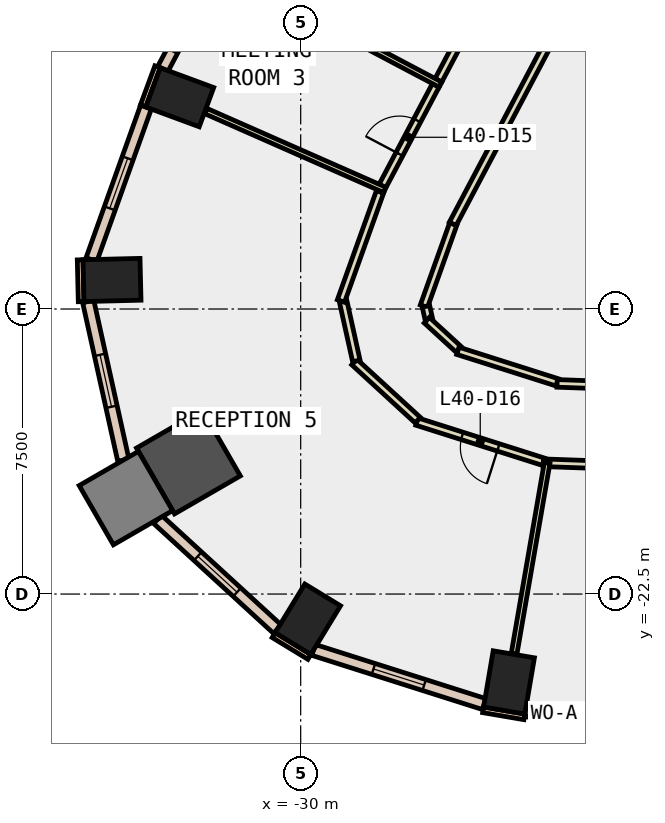
"""IFC4 building model, lengths in metres.
Left out: names, types, materials, properties, quantities, classifications, styles, units other than length and angle.
Written with IfcOpenShell. Run it as: python <this file> out.ifc"""

import sys

from ifc_helpers import new_model, si_unit, direction, frame, frame_2d, origin, origin_2d, place, context, subcontext, project, spatial, rectangle, extrude, element, fill, save


model = new_model("IFC4")
c1 = context("Model", 3, precision=1e-05, world=origin(), true_north=direction((0.0, 1.0)))
c2 = subcontext(c1, "Body", "Model", "MODEL_VIEW")
j1 = project(units=[si_unit("LENGTHUNIT", "METRE"), si_unit("PLANEANGLEUNIT", "RADIAN")], contexts=[c1])
p1 = place(None, origin())
s1 = spatial("IfcSite", under=j1, at=p1, CompositionType="ELEMENT")
p2 = place(p1, origin())
s2 = spatial("IfcBuilding", under=s1, at=p2, CompositionType="ELEMENT")
p3 = place(p2, frame((0.0, 0.0, 180.2)))
s3 = spatial("IfcBuildingStorey", under=s2, at=p3, CompositionType="ELEMENT", Elevation=180.2)
for number, where, z_axis, x_axis in (
    (1, (-24.518, -24.825, -0.4), (0.0, 0.0, 1.0), (-0.986, 0.168, 0.0)),
    (2, (-33.183, -9.429, -0.4), (0.0, 0.0, 1.0), (0.347, 0.938, 0.0)),
    (3, (-34.965, -14.236, -0.4), (0.0, 0.0, 1.0), (-0.024, 1.0, 0.0)),
):
    element("IfcColumn", number, at=place(p3, frame(where, z_axis=z_axis, x_axis=x_axis)), inside=s3, PredefinedType="COLUMN", context=c2, shape_type="SweptSolid", body=[
        extrude(rectangle(XDim=1.1, YDim=1.5, at=origin_2d()), origin(), (0.0, 0.0, 1.0), 4.0),
    ])
p4 = place(p3, frame((-32.954, -19.025, -0.4), z_axis=(0.0, 0.0, 1.0), x_axis=(0.866025403784, 0.5, 0.0)))
e4 = element("IfcColumn", 4, at=p4, inside=s3, PredefinedType="COLUMN", context=c2, shape_type="SweptSolid", body=[
    extrude(rectangle(XDim=2.0, YDim=2.0, at=origin_2d()), origin(), (0.0, 0.0, 1.0), 4.0),
])
p5 = place(p3, frame((-29.812, -23.163, -0.4), z_axis=(0.0, 0.0, 1.0), x_axis=(-0.853714435155, 0.520741455243, 0.0)))
e5 = element("IfcColumn", 5, at=p5, inside=s3, PredefinedType="COLUMN", context=c2, shape_type="SweptSolid", body=[
    extrude(rectangle(XDim=1.1, YDim=1.5, at=origin_2d()), origin(), (0.0, 0.0, 1.0), 4.0),
])
p6 = place(p3, frame((-34.599, -19.975, -0.4), z_axis=(0.0, 0.0, 1.0), x_axis=(0.866025403784, 0.5, 0.0)))
e6 = element("IfcColumn", 6, at=p6, inside=s3, PredefinedType="COLUMN", context=c2, shape_type="SweptSolid", body=[
    extrude(rectangle(XDim=1.8, YDim=1.8, at=origin_2d()), origin(), (0.0, 0.0, 1.0), 4.0),
])
p7 = place(p3, frame((-33.766, -8.627, 0.0), z_axis=(0.0, 0.0, 1.0), x_axis=(-0.346229846278, -0.938149718087, 0.0)))
e7 = element("IfcWall", 7, at=p7, inside=s3, PredefinedType="STANDARD", context=c2, shape_type="SweptSolid", body=[
    extrude(rectangle(XDim=1.1, YDim=0.15, at=frame_2d((0.55, 0.0))), origin(), (0.0, 0.0, 1.0), 3.6),
])
p8 = place(p3, frame((-25.199, -25.546, 0.0), z_axis=(0.0, 0.0, 1.0), x_axis=(0.985763338892, -0.168138751323, 0.0)))
e8 = element("IfcWall", 8, at=p8, inside=s3, PredefinedType="STANDARD", context=c2, shape_type="SweptSolid", body=[
    extrude(rectangle(XDim=1.101, YDim=0.15, at=frame_2d((0.55, 0.0))), origin(), (0.0, 0.0, 1.0), 3.6),
])
p9 = place(p3, frame((-35.803, -13.706, 0.0), z_axis=(0.0, 0.0, 1.0), x_axis=(0.023522901136, -0.999723298279, 0.0)))
e9 = element("IfcWall", 9, at=p9, inside=s3, PredefinedType="STANDARD", context=c2, shape_type="SweptSolid", body=[
    extrude(rectangle(XDim=1.1, YDim=0.15, at=frame_2d((0.55, 0.0))), origin(), (0.0, 0.0, 1.0), 3.6),
])
p10 = place(p3, frame((-30.711, -23.581, 0.0), z_axis=(0.0, 0.0, 1.0), x_axis=(0.854005542721, -0.520263907071, 0.0)))
e10 = element("IfcWall", 10, at=p10, inside=s3, PredefinedType="STANDARD", context=c2, shape_type="SweptSolid", body=[
    extrude(rectangle(XDim=1.099, YDim=0.15, at=frame_2d((0.55, 0.0))), origin(), (0.0, 0.0, 1.0), 3.6),
])
p11 = place(p3, frame((-24.09, -25.583, 0.0), z_axis=(0.0, 0.0, 1.0), x_axis=(0.999368368263, -0.035536805082, 0.0)))
e11 = element("IfcWall", 11, at=p11, inside=s3, PredefinedType="STANDARD", context=c2, shape_type="SweptSolid", body=[
    extrude(rectangle(XDim=7.317, YDim=0.3, at=frame_2d((3.658, 0.0))), origin(), (0.0, 0.0, 1.0), 3.6),
])
p12 = place(p11, frame((0.629, 0.0, 0.9)))
e12 = element("IfcOpeningElement", 12, at=p12, cuts=e11, PredefinedType="OPENING", context=c2, shape_type="SweptSolid", body=[
    extrude(rectangle(XDim=2.4, YDim=2.6, at=frame_2d((1.2, 1.3))), frame((0.0, 0.16, 0.0), z_axis=(0.0, -1.0, 0.0), x_axis=(1.0, 0.0, 0.0)), (0.0, 0.0, 1.0), 0.32),
])
p13 = place(p11, frame((4.287, 0.0, 0.9)))
e13 = element("IfcOpeningElement", 13, at=p13, cuts=e11, PredefinedType="OPENING", context=c2, shape_type="SweptSolid", body=[
    extrude(rectangle(XDim=2.4, YDim=2.6, at=frame_2d((1.2, 1.3))), frame((0.0, 0.16, 0.0), z_axis=(0.0, -1.0, 0.0), x_axis=(1.0, 0.0, 0.0)), (0.0, 0.0, 1.0), 0.32),
])
p14 = place(p3, frame((-30.765, -3.271, 0.0), z_axis=(0.0, 0.0, 1.0), x_axis=(-0.467572383403, -0.883954787463, 0.0)))
e14 = element("IfcWall", 14, at=p14, inside=s3, PredefinedType="STANDARD", context=c2, shape_type="SweptSolid", body=[
    extrude(rectangle(XDim=6.119, YDim=0.3, at=frame_2d((3.06, 0.0))), origin(), (0.0, 0.0, 1.0), 3.6),
])
p15 = place(p14, frame((0.53, 0.0, 0.9)))
e15 = element("IfcOpeningElement", 15, at=p15, cuts=e14, PredefinedType="OPENING", context=c2, shape_type="SweptSolid", body=[
    extrude(rectangle(XDim=2.0, YDim=2.6, at=frame_2d((1.0, 1.3))), frame((0.0, 0.16, 0.0), z_axis=(0.0, -1.0, 0.0), x_axis=(1.0, 0.0, 0.0)), (0.0, 0.0, 1.0), 0.32),
])
p16 = place(p14, frame((3.589, 0.0, 0.9)))
e16 = element("IfcOpeningElement", 16, at=p16, cuts=e14, PredefinedType="OPENING", context=c2, shape_type="SweptSolid", body=[
    extrude(rectangle(XDim=2.0, YDim=2.6, at=frame_2d((1.0, 1.3))), frame((0.0, 0.16, 0.0), z_axis=(0.0, -1.0, 0.0), x_axis=(1.0, 0.0, 0.0)), (0.0, 0.0, 1.0), 0.32),
])
p17 = place(p3, frame((-34.071, -9.686, 0.0), z_axis=(0.0, 0.0, 1.0), x_axis=(-0.336652028742, -0.941629126325, 0.0)))
e17 = element("IfcWall", 17, at=p17, inside=s3, PredefinedType="STANDARD", context=c2, shape_type="SweptSolid", body=[
    extrude(rectangle(XDim=4.263, YDim=0.3, at=frame_2d((2.131, 0.0))), origin(), (0.0, 0.0, 1.0), 3.6),
])
p18 = place(p17, frame((1.431, 0.0, 0.9)))
e18 = element("IfcOpeningElement", 18, at=p18, cuts=e17, PredefinedType="OPENING", context=c2, shape_type="SweptSolid", body=[
    extrude(rectangle(XDim=1.4, YDim=2.6, at=frame_2d((0.7, 1.3))), frame((0.0, 0.16, 0.0), z_axis=(0.0, -1.0, 0.0), x_axis=(1.0, 0.0, 0.0)), (0.0, 0.0, 1.0), 0.32),
])
p19 = place(p3, frame((-35.591, -14.801, 0.0), z_axis=(0.0, 0.0, 1.0), x_axis=(0.216102175589, -0.976370754225, 0.0)))
e19 = element("IfcWall", 19, at=p19, inside=s3, PredefinedType="STANDARD", context=c2, shape_type="SweptSolid", body=[
    extrude(rectangle(XDim=4.276, YDim=0.3, at=frame_2d((2.138, 0.0))), origin(), (0.0, 0.0, 1.0), 3.6),
])
p20 = place(p19, frame((1.438, 0.0, 0.9)))
e20 = element("IfcOpeningElement", 20, at=p20, cuts=e19, PredefinedType="OPENING", context=c2, shape_type="SweptSolid", body=[
    extrude(rectangle(XDim=1.4, YDim=2.6, at=frame_2d((0.7, 1.3))), frame((0.0, 0.16, 0.0), z_axis=(0.0, -1.0, 0.0), x_axis=(1.0, 0.0, 0.0)), (0.0, 0.0, 1.0), 0.32),
])
p21 = place(p3, frame((-33.768, -20.533, 0.0), z_axis=(0.0, 0.0, 1.0), x_axis=(0.737279680174, -0.675587650274, 0.0)))
e21 = element("IfcWall", 21, at=p21, inside=s3, PredefinedType="STANDARD", context=c2, shape_type="SweptSolid", body=[
    extrude(rectangle(XDim=4.278, YDim=0.3, at=frame_2d((2.139, 0.0))), origin(), (0.0, 0.0, 1.0), 3.6),
])
p22 = place(p21, frame((1.439, 0.0, 0.9)))
e22 = element("IfcOpeningElement", 22, at=p22, cuts=e21, PredefinedType="OPENING", context=c2, shape_type="SweptSolid", body=[
    extrude(rectangle(XDim=1.4, YDim=2.6, at=frame_2d((0.7, 1.3))), frame((0.0, 0.16, 0.0), z_axis=(0.0, -1.0, 0.0), x_axis=(1.0, 0.0, 0.0)), (0.0, 0.0, 1.0), 0.32),
])
p23 = place(p3, frame((-29.662, -23.97, 0.0), z_axis=(0.0, 0.0, 1.0), x_axis=(0.953145379857, -0.302512619337, 0.0)))
e23 = element("IfcWall", 23, at=p23, inside=s3, PredefinedType="STANDARD", context=c2, shape_type="SweptSolid", body=[
    extrude(rectangle(XDim=4.711, YDim=0.3, at=frame_2d((2.355, 0.0))), origin(), (0.0, 0.0, 1.0), 3.6),
])
p24 = place(p23, frame((1.655, 0.0, 0.9)))
e24 = element("IfcOpeningElement", 24, at=p24, cuts=e23, PredefinedType="OPENING", context=c2, shape_type="SweptSolid", body=[
    extrude(rectangle(XDim=1.4, YDim=2.6, at=frame_2d((0.7, 1.3))), frame((0.0, 0.16, 0.0), z_axis=(0.0, -1.0, 0.0), x_axis=(1.0, 0.0, 0.0)), (0.0, 0.0, 1.0), 0.32),
])
p25 = place(p3, frame((-22.888, -6.878, 0.0), z_axis=(0.0, 0.0, 1.0), x_axis=(-0.467533790284, -0.883975200411, 0.0)))
e25 = element("IfcWall", 25, at=p25, inside=s3, PredefinedType="PARTITIONING", context=c2, shape_type="SweptSolid", body=[
    extrude(rectangle(XDim=6.656, YDim=0.2, at=frame_2d((3.328, 0.0))), origin(), (0.0, 0.0, 1.0), 3.6),
])
p26 = place(p3, frame((-25.987, -12.768, 0.0), z_axis=(0.0, 0.0, 1.0), x_axis=(-0.33645112914, -0.941700927949, 0.0)))
e26 = element("IfcWall", 26, at=p26, inside=s3, PredefinedType="PARTITIONING", context=c2, shape_type="SweptSolid", body=[
    extrude(rectangle(XDim=2.292, YDim=0.2, at=frame_2d((1.146, 0.0))), origin(), (0.0, 0.0, 1.0), 3.6),
])
p27 = place(p3, frame((-26.703, -14.93, 0.0), z_axis=(0.0, 0.0, 1.0), x_axis=(0.216250293589, -0.976337959173, 0.0)))
e27 = element("IfcWall", 27, at=p27, inside=s3, PredefinedType="PARTITIONING", context=c2, shape_type="SweptSolid", body=[
    extrude(rectangle(XDim=0.342, YDim=0.2, at=frame_2d((0.171, 0.0))), origin(), (0.0, 0.0, 1.0), 3.6),
])
p28 = place(p3, frame((-26.681, -15.294, 0.0), z_axis=(0.0, 0.0, 1.0), x_axis=(0.737118519418, -0.675763485497, 0.0)))
e28 = element("IfcWall", 28, at=p28, inside=s3, PredefinedType="PARTITIONING", context=c2, shape_type="SweptSolid", body=[
    extrude(rectangle(XDim=1.138, YDim=0.2, at=frame_2d((0.569, 0.0))), origin(), (0.0, 0.0, 1.0), 3.6),
])
p29 = place(p3, frame((-25.864, -16.1, 0.0), z_axis=(0.0, 0.0, 1.0), x_axis=(0.953158072423, -0.302472625167, 0.0)))
e29 = element("IfcWall", 29, at=p29, inside=s3, PredefinedType="PARTITIONING", context=c2, shape_type="SweptSolid", body=[
    extrude(rectangle(XDim=2.743, YDim=0.2, at=frame_2d((1.372, 0.0))), origin(), (0.0, 0.0, 1.0), 3.6),
])
p30 = place(p3, frame((-23.253, -16.957, 0.0), z_axis=(0.0, 0.0, 1.0), x_axis=(0.999365460355, -0.035618487468, 0.0)))
e30 = element("IfcWall", 30, at=p30, inside=s3, PredefinedType="PARTITIONING", context=c2, shape_type="SweptSolid", body=[
    extrude(rectangle(XDim=7.272, YDim=0.2, at=frame_2d((3.636, 0.0))), origin(), (0.0, 0.0, 1.0), 3.6),
])
p31 = place(p3, frame((-26.376, -8.982, 0.0), z_axis=(0.0, 0.0, 1.0), x_axis=(0.467529077139, 0.883977693174, 0.0)))
e31 = element("IfcWall", 31, at=p31, inside=s3, PredefinedType="PARTITIONING", context=c2, shape_type="SweptSolid", body=[
    extrude(rectangle(XDim=3.503, YDim=0.2, at=frame_2d((1.752, 0.0))), origin(), (0.0, 0.0, 1.0), 3.6),
])
p32 = place(p3, frame((-27.891, -11.847, 0.0), z_axis=(0.0, 0.0, 1.0), x_axis=(0.467571923705, 0.883955030623, 0.0)))
e32 = element("IfcWall", 32, at=p32, inside=s3, PredefinedType="PARTITIONING", context=c2, shape_type="SweptSolid", body=[
    extrude(rectangle(XDim=3.091, YDim=0.2, at=frame_2d((1.545, 0.0))), origin(), (0.0, 0.0, 1.0), 3.6),
])
p33 = place(p32, frame((1.045, 0.0, 0.0)))
e33 = element("IfcOpeningElement", 33, at=p33, cuts=e32, PredefinedType="OPENING", context=c2, shape_type="SweptSolid", body=[
    extrude(rectangle(XDim=1.0, YDim=2.1, at=frame_2d((0.5, 1.05))), frame((0.0, 0.11, 0.0), z_axis=(0.0, -1.0, 0.0), x_axis=(1.0, 0.0, 0.0)), (0.0, 0.0, 1.0), 0.22),
])
p34 = place(p3, frame((-23.61, -19.019, 0.0), z_axis=(0.0, 0.0, 1.0), x_axis=(-0.953121068097, 0.302589209243, 0.0)))
e34 = element("IfcWall", 34, at=p34, inside=s3, PredefinedType="PARTITIONING", context=c2, shape_type="SweptSolid", body=[
    extrude(rectangle(XDim=3.494, YDim=0.2, at=frame_2d((1.747, 0.0))), origin(), (0.0, 0.0, 1.0), 3.6),
])
p35 = place(p34, frame((1.247, 0.0, 0.0)))
e35 = element("IfcOpeningElement", 35, at=p35, cuts=e34, PredefinedType="OPENING", context=c2, shape_type="SweptSolid", body=[
    extrude(rectangle(XDim=1.0, YDim=2.1, at=frame_2d((0.5, 1.05))), frame((0.0, 0.11, 0.0), z_axis=(0.0, -1.0, 0.0), x_axis=(1.0, 0.0, 0.0)), (0.0, 0.0, 1.0), 0.22),
])
p36 = place(p3, frame((-26.919, -17.925, 0.0), z_axis=(0.0, 0.0, 1.0), x_axis=(-0.737118331834, 0.675763690112, 0.0)))
e36 = element("IfcWall", 36, at=p36, inside=s3, PredefinedType="PARTITIONING", context=c2, shape_type="SweptSolid", body=[
    extrude(rectangle(XDim=2.264, YDim=0.2, at=frame_2d((1.132, 0.0))), origin(), (0.0, 0.0, 1.0), 3.6),
])
p37 = place(p3, frame((-28.536, -16.365, 0.0), z_axis=(0.0, 0.0, 1.0), x_axis=(-0.216223984898, 0.976343785946, 0.0)))
e37 = element("IfcWall", 37, at=p37, inside=s3, PredefinedType="PARTITIONING", context=c2, shape_type="SweptSolid", body=[
    extrude(rectangle(XDim=1.61, YDim=0.2, at=frame_2d((0.805, 0.0))), origin(), (0.0, 0.0, 1.0), 3.6),
])
p38 = place(p3, frame((-28.94, -14.789, 0.0), z_axis=(0.0, 0.0, 1.0), x_axis=(0.336864004528, 0.941553313654, 0.0)))
e38 = element("IfcWall", 38, at=p38, inside=s3, PredefinedType="PARTITIONING", context=c2, shape_type="SweptSolid", body=[
    extrude(rectangle(XDim=3.048, YDim=0.2, at=frame_2d((1.524, 0.0))), origin(), (0.0, 0.0, 1.0), 3.6),
])
p39 = place(p3, frame((-16.045, -19.316, 0.0), z_axis=(0.0, 0.0, 1.0), x_axis=(-0.999359853626, 0.035775451915, 0.0)))
e39 = element("IfcWall", 39, at=p39, inside=s3, PredefinedType="PARTITIONING", context=c2, shape_type="SweptSolid", body=[
    extrude(rectangle(XDim=7.575, YDim=0.2, at=frame_2d((3.788, 0.0))), origin(), (0.0, 0.0, 1.0), 3.6),
])
p40 = place(p39, frame((3.288, 0.0, 0.0)))
e40 = element("IfcOpeningElement", 40, at=p40, cuts=e39, PredefinedType="OPENING", context=c2, shape_type="SweptSolid", body=[
    extrude(rectangle(XDim=1.0, YDim=2.1, at=frame_2d((0.5, 1.05))), frame((0.0, 0.11, 0.0), z_axis=(0.0, -1.0, 0.0), x_axis=(1.0, 0.0, 0.0)), (0.0, 0.0, 1.0), 0.22),
])
p41 = place(p3, frame((-26.323, -9.095, 0.0), z_axis=(0.0, 0.0, 1.0), x_axis=(-0.883977869384, 0.467528743971, 0.0)))
e41 = element("IfcWall", 41, at=p41, inside=s3, PredefinedType="PARTITIONING", context=c2, shape_type="SweptSolid", body=[
    extrude(rectangle(XDim=6.5, YDim=0.15, at=frame_2d((3.25, 0.0))), origin(), (0.0, 0.0, 1.0), 3.6),
])
p42 = place(p3, frame((-27.788, -11.865, 0.0), z_axis=(0.0, 0.0, 1.0), x_axis=(-0.915139307711, 0.403137752489, 0.0)))
e42 = element("IfcWall", 42, at=p42, inside=s3, PredefinedType="PARTITIONING", context=c2, shape_type="SweptSolid", body=[
    extrude(rectangle(XDim=5.145, YDim=0.15, at=frame_2d((2.572, 0.0))), origin(), (0.0, 0.0, 1.0), 3.6),
])
p43 = place(p3, frame((-23.515, -19.049, 0.0), z_axis=(0.0, 0.0, 1.0), x_axis=(-0.170669435204, -0.985328343187, 0.0)))
e43 = element("IfcWall", 43, at=p43, inside=s3, PredefinedType="PARTITIONING", context=c2, shape_type="SweptSolid", body=[
    extrude(rectangle(XDim=5.093, YDim=0.15, at=frame_2d((2.546, 0.0))), origin(), (0.0, 0.0, 1.0), 3.6),
])
p44 = place(p12, origin())
e44 = element("IfcWindow", 44, at=p44, inside=s3, PartitioningType="SINGLE_PANEL", PredefinedType="WINDOW", context=c2, shape_type="SweptSolid", body=[
    extrude(rectangle(XDim=2.4, YDim=2.6, at=frame_2d((1.2, 1.3))), frame((0.0, 0.03, 0.0), z_axis=(0.0, -1.0, 0.0), x_axis=(1.0, 0.0, 0.0)), (0.0, 0.0, 1.0), 0.06),
])
fill(e12, e44)
p45 = place(p18, origin())
e45 = element("IfcWindow", 45, at=p45, inside=s3, PartitioningType="SINGLE_PANEL", PredefinedType="WINDOW", context=c2, shape_type="SweptSolid", body=[
    extrude(rectangle(XDim=1.4, YDim=2.6, at=frame_2d((0.7, 1.3))), frame((0.0, 0.03, 0.0), z_axis=(0.0, -1.0, 0.0), x_axis=(1.0, 0.0, 0.0)), (0.0, 0.0, 1.0), 0.06),
])
fill(e18, e45)
p46 = place(p20, origin())
e46 = element("IfcWindow", 46, at=p46, inside=s3, PartitioningType="SINGLE_PANEL", PredefinedType="WINDOW", context=c2, shape_type="SweptSolid", body=[
    extrude(rectangle(XDim=1.4, YDim=2.6, at=frame_2d((0.7, 1.3))), frame((0.0, 0.03, 0.0), z_axis=(0.0, -1.0, 0.0), x_axis=(1.0, 0.0, 0.0)), (0.0, 0.0, 1.0), 0.06),
])
fill(e20, e46)
p47 = place(p22, origin())
e47 = element("IfcWindow", 47, at=p47, inside=s3, PartitioningType="SINGLE_PANEL", PredefinedType="WINDOW", context=c2, shape_type="SweptSolid", body=[
    extrude(rectangle(XDim=1.4, YDim=2.6, at=frame_2d((0.7, 1.3))), frame((0.0, 0.03, 0.0), z_axis=(0.0, -1.0, 0.0), x_axis=(1.0, 0.0, 0.0)), (0.0, 0.0, 1.0), 0.06),
])
fill(e22, e47)
p48 = place(p24, origin())
e48 = element("IfcWindow", 48, at=p48, inside=s3, PartitioningType="SINGLE_PANEL", PredefinedType="WINDOW", context=c2, shape_type="SweptSolid", body=[
    extrude(rectangle(XDim=1.4, YDim=2.6, at=frame_2d((0.7, 1.3))), frame((0.0, 0.03, 0.0), z_axis=(0.0, -1.0, 0.0), x_axis=(1.0, 0.0, 0.0)), (0.0, 0.0, 1.0), 0.06),
])
fill(e24, e48)
p49 = place(p33, origin())
e49 = element("IfcDoor", 49, at=p49, inside=s3, OperationType="SINGLE_SWING_LEFT", PredefinedType="DOOR", context=c2, shape_type="SweptSolid", body=[
    extrude(rectangle(XDim=1.0, YDim=2.1, at=frame_2d((0.5, 1.05))), frame((0.0, 0.025, 0.0), z_axis=(0.0, -1.0, 0.0), x_axis=(1.0, 0.0, 0.0)), (0.0, 0.0, 1.0), 0.05),
])
fill(e33, e49)
p50 = place(p35, origin())
e50 = element("IfcDoor", 50, at=p50, inside=s3, OperationType="SINGLE_SWING_LEFT", PredefinedType="DOOR", context=c2, shape_type="SweptSolid", body=[
    extrude(rectangle(XDim=1.0, YDim=2.1, at=frame_2d((0.5, 1.05))), frame((0.0, 0.025, 0.0), z_axis=(0.0, -1.0, 0.0), x_axis=(1.0, 0.0, 0.0)), (0.0, 0.0, 1.0), 0.05),
])
fill(e35, e50)
save(model, sys.argv[1])
